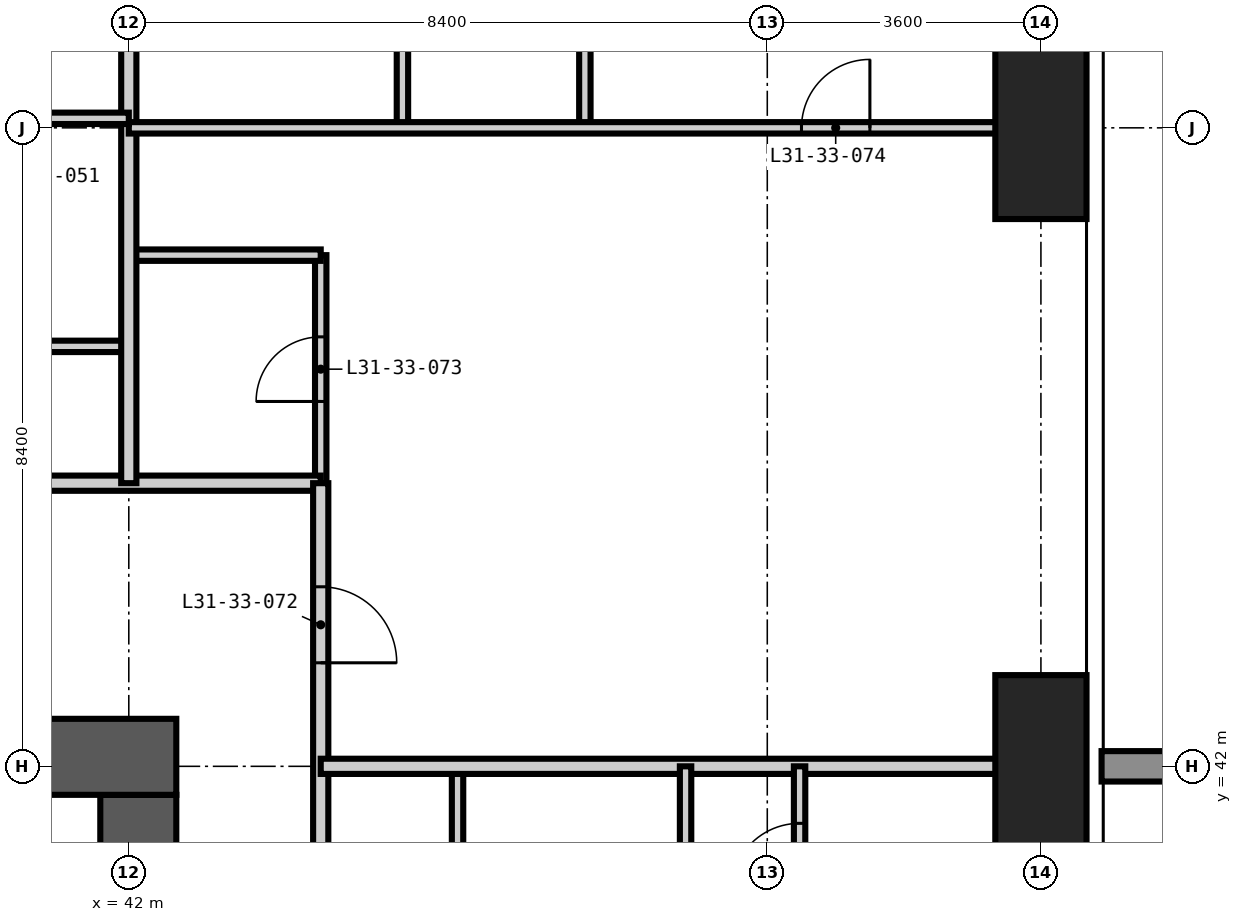
"""IFC4 building model, lengths in metres.
Left out: names, types, materials, properties, quantities, classifications, styles, units other than length and angle.
Written with IfcOpenShell. Run it as: python <this file> out.ifc"""

import sys

from ifc_helpers import new_model, si_unit, direction, frame, frame_2d, origin, origin_2d, place, context, subcontext, project, spatial, rectangle, extrude, element, fill, save


model = new_model("IFC4")
c1 = context("Model", 3, precision=1e-05, world=origin(), true_north=direction((0.0, 1.0)))
c2 = subcontext(c1, "Body", "Model", "MODEL_VIEW")
j1 = project(units=[si_unit("LENGTHUNIT", "METRE"), si_unit("PLANEANGLEUNIT", "RADIAN")], contexts=[c1])
p1 = place(None, origin())
s1 = spatial("IfcSite", under=j1, at=p1, CompositionType="ELEMENT")
p2 = place(p1, origin())
s2 = spatial("IfcBuilding", under=s1, at=p2, CompositionType="ELEMENT")
p3 = place(p2, frame((0.0, 0.0, 122.4)))
s3 = spatial("IfcBuildingStorey", under=s2, at=p3, CompositionType="ELEMENT", Elevation=122.4)
for number, where, z_axis, x_axis in (
    (1, (54.0, 42.0, -0.35), (0.0, 0.0, 1.0), (1.0, 0.0, 0.0)),
    (2, (54.0, 50.4, -0.35), (0.0, 0.0, 1.0), (1.0, 0.0, 0.0)),
):
    element("IfcColumn", number, at=place(p3, frame(where, z_axis=z_axis, x_axis=x_axis)), inside=s3, PredefinedType="COLUMN", context=c2, shape_type="SweptSolid", body=[
        extrude(rectangle(XDim=1.2, YDim=2.4, at=origin_2d()), origin(), (0.0, 0.0, 1.0), 3.6),
    ])
p4 = place(p3, frame((42.125, 17.175, -0.35), z_axis=(0.0, 0.0, 1.0), x_axis=(0.0, 1.0, 0.0)))
e3 = element("IfcWall", 3, at=p4, inside=s3, PredefinedType="SHEAR", context=c2, shape_type="SweptSolid", body=[
    extrude(rectangle(XDim=24.45, YDim=1.0, at=frame_2d((12.225, 0.0))), origin(), (0.0, 0.0, 1.0), 3.6),
])
p5 = place(p4, frame((0.425, 0.0, 0.35)))
e4 = element("IfcOpeningElement", 4, at=p5, cuts=e3, PredefinedType="OPENING", context=c2, shape_type="SweptSolid", body=[
    extrude(rectangle(XDim=1.2, YDim=2.2, at=frame_2d((0.6, 1.1))), frame((0.0, 0.51, 0.0), z_axis=(0.0, -1.0, 0.0), x_axis=(1.0, 0.0, 0.0)), (0.0, 0.0, 1.0), 1.02),
])
p6 = place(p4, frame((11.325, 0.0, 0.35)))
e5 = element("IfcOpeningElement", 5, at=p6, cuts=e3, PredefinedType="OPENING", context=c2, shape_type="SweptSolid", body=[
    extrude(rectangle(XDim=1.8, YDim=2.2, at=frame_2d((0.9, 1.1))), frame((0.0, 0.51, 0.0), z_axis=(0.0, -1.0, 0.0), x_axis=(1.0, 0.0, 0.0)), (0.0, 0.0, 1.0), 1.02),
])
p7 = place(p4, frame((20.125, 0.0, 0.35)))
e6 = element("IfcOpeningElement", 6, at=p7, cuts=e3, PredefinedType="OPENING", context=c2, shape_type="SweptSolid", body=[
    extrude(rectangle(XDim=1.0, YDim=2.1, at=frame_2d((0.5, 1.05))), frame((0.0, 0.51, 0.0), z_axis=(0.0, -1.0, 0.0), x_axis=(1.0, 0.0, 0.0)), (0.0, 0.0, 1.0), 1.02),
])
p8 = place(p3, frame((42.625, 42.125, -0.35), z_axis=(0.0, 0.0, 1.0), x_axis=(-1.0, 0.0, 0.0)))
e7 = element("IfcWall", 7, at=p8, inside=s3, PredefinedType="SHEAR", context=c2, shape_type="SweptSolid", body=[
    extrude(rectangle(XDim=26.45, YDim=1.0, at=frame_2d((13.225, 0.0))), origin(), (0.0, 0.0, 1.0), 3.6),
])
p9 = place(p8, frame((21.125, 0.0, 0.35)))
e8 = element("IfcOpeningElement", 8, at=p9, cuts=e7, PredefinedType="OPENING", context=c2, shape_type="SweptSolid", body=[
    extrude(rectangle(XDim=1.0, YDim=2.1, at=frame_2d((0.5, 1.05))), frame((0.0, 0.51, 0.0), z_axis=(0.0, -1.0, 0.0), x_axis=(1.0, 0.0, 0.0)), (0.0, 0.0, 1.0), 1.02),
])
p10 = place(p8, frame((10.525, 0.0, 0.35)))
e9 = element("IfcOpeningElement", 9, at=p10, cuts=e7, PredefinedType="OPENING", context=c2, shape_type="SweptSolid", body=[
    extrude(rectangle(XDim=1.2, YDim=2.2, at=frame_2d((0.6, 1.1))), frame((0.0, 0.51, 0.0), z_axis=(0.0, -1.0, 0.0), x_axis=(1.0, 0.0, 0.0)), (0.0, 0.0, 1.0), 1.02),
])
p11 = place(p3, frame((44.525, 45.725, 0.0), z_axis=(0.0, 0.0, 1.0), x_axis=(0.0, 1.0, 0.0)))
e10 = element("IfcWall", 10, at=p11, inside=s3, PredefinedType="PARTITIONING", context=c2, shape_type="SweptSolid", body=[
    extrude(rectangle(XDim=3.0, YDim=0.15, at=frame_2d((1.5, 0.0))), origin(), (0.0, 0.0, 1.0), 3.25),
])
p12 = place(p11, frame((1.075, 0.0, 0.0)))
e11 = element("IfcOpeningElement", 11, at=p12, cuts=e10, PredefinedType="OPENING", context=c2, shape_type="SweptSolid", body=[
    extrude(rectangle(XDim=0.85, YDim=2.1, at=frame_2d((0.425, 1.05))), frame((0.0, 0.085, 0.0), z_axis=(0.0, -1.0, 0.0), x_axis=(1.0, 0.0, 0.0)), (0.0, 0.0, 1.0), 0.17),
])
for number, where, z_axis, x_axis in (
    (12, (46.325, 39.6, 0.0), (0.0, 0.0, 1.0), (0.0, 1.0, 0.0)),
    (13, (39.6, 47.525, 0.0), (0.0, 0.0, 1.0), (1.0, 0.0, 0.0)),
):
    element("IfcWall", number, at=place(p3, frame(where, z_axis=z_axis, x_axis=x_axis)), inside=s3, PredefinedType="PARTITIONING", context=c2, shape_type="SweptSolid", body=[
        extrude(rectangle(XDim=2.4, YDim=0.15, at=frame_2d((1.2, 0.0))), origin(), (0.0, 0.0, 1.0), 3.25),
    ])
p13 = place(p3, frame((42.0, 48.725, 0.0), z_axis=(0.0, 0.0, 1.0), x_axis=(1.0, 0.0, 0.0)))
e14 = element("IfcWall", 14, at=p13, inside=s3, PredefinedType="PARTITIONING", context=c2, shape_type="SweptSolid", body=[
    extrude(rectangle(XDim=2.525, YDim=0.15, at=frame_2d((1.262, 0.0))), origin(), (0.0, 0.0, 1.0), 3.25),
])
p14 = place(p3, frame((12.6, 45.725, 0.0), z_axis=(0.0, 0.0, 1.0), x_axis=(1.0, 0.0, 0.0)))
e15 = element("IfcWall", 15, at=p14, inside=s3, PredefinedType="PARTITIONING", context=c2, shape_type="SweptSolid", body=[
    extrude(rectangle(XDim=31.925, YDim=0.2, at=frame_2d((15.962, 0.0))), origin(), (0.0, 0.0, 1.0), 3.25),
])
p15 = place(p14, frame((6.7, 0.0, 0.0)))
e16 = element("IfcOpeningElement", 16, at=p15, cuts=e15, PredefinedType="OPENING", context=c2, shape_type="SweptSolid", body=[
    extrude(rectangle(XDim=1.0, YDim=2.2, at=frame_2d((0.5, 1.1))), frame((0.0, 0.11, 0.0), z_axis=(0.0, -1.0, 0.0), x_axis=(1.0, 0.0, 0.0)), (0.0, 0.0, 1.0), 0.22),
])
p16 = place(p14, frame((17.5, 0.0, 0.0)))
e17 = element("IfcOpeningElement", 17, at=p16, cuts=e15, PredefinedType="OPENING", context=c2, shape_type="SweptSolid", body=[
    extrude(rectangle(XDim=1.0, YDim=2.2, at=frame_2d((0.5, 1.1))), frame((0.0, 0.11, 0.0), z_axis=(0.0, -1.0, 0.0), x_axis=(1.0, 0.0, 0.0)), (0.0, 0.0, 1.0), 0.22),
])
p17 = place(p14, frame((23.5, 0.0, 0.0)))
e18 = element("IfcOpeningElement", 18, at=p17, cuts=e15, PredefinedType="OPENING", context=c2, shape_type="SweptSolid", body=[
    extrude(rectangle(XDim=1.0, YDim=2.2, at=frame_2d((0.5, 1.1))), frame((0.0, 0.11, 0.0), z_axis=(0.0, -1.0, 0.0), x_axis=(1.0, 0.0, 0.0)), (0.0, 0.0, 1.0), 0.22),
])
p18 = place(p3, frame((44.525, 45.725, 0.0), z_axis=(0.0, 0.0, 1.0), x_axis=(0.0, -1.0, 0.0)))
e19 = element("IfcWall", 19, at=p18, inside=s3, PredefinedType="PARTITIONING", context=c2, shape_type="SweptSolid", body=[
    extrude(rectangle(XDim=32.05, YDim=0.2, at=frame_2d((16.025, 0.0))), origin(), (0.0, 0.0, 1.0), 3.25),
])
p19 = place(p18, frame((25.425, 0.0, 0.0)))
e20 = element("IfcOpeningElement", 20, at=p19, cuts=e19, PredefinedType="OPENING", context=c2, shape_type="SweptSolid", body=[
    extrude(rectangle(XDim=1.0, YDim=2.2, at=frame_2d((0.5, 1.1))), frame((0.0, 0.11, 0.0), z_axis=(0.0, -1.0, 0.0), x_axis=(1.0, 0.0, 0.0)), (0.0, 0.0, 1.0), 0.22),
])
p20 = place(p18, frame((14.625, 0.0, 0.0)))
e21 = element("IfcOpeningElement", 21, at=p20, cuts=e19, PredefinedType="OPENING", context=c2, shape_type="SweptSolid", body=[
    extrude(rectangle(XDim=1.0, YDim=2.2, at=frame_2d((0.5, 1.1))), frame((0.0, 0.11, 0.0), z_axis=(0.0, -1.0, 0.0), x_axis=(1.0, 0.0, 0.0)), (0.0, 0.0, 1.0), 0.22),
])
p21 = place(p18, frame((8.625, 0.0, 0.0)))
e22 = element("IfcOpeningElement", 22, at=p21, cuts=e19, PredefinedType="OPENING", context=c2, shape_type="SweptSolid", body=[
    extrude(rectangle(XDim=1.0, YDim=2.2, at=frame_2d((0.5, 1.1))), frame((0.0, 0.11, 0.0), z_axis=(0.0, -1.0, 0.0), x_axis=(1.0, 0.0, 0.0)), (0.0, 0.0, 1.0), 0.22),
])
p22 = place(p18, frame((29.987, 0.0, 0.0)))
e23 = element("IfcOpeningElement", 23, at=p22, cuts=e19, PredefinedType="OPENING", context=c2, shape_type="SweptSolid", body=[
    extrude(rectangle(XDim=1.0, YDim=2.2, at=frame_2d((0.5, 1.1))), frame((0.0, 0.11, 0.0), z_axis=(0.0, -1.0, 0.0), x_axis=(1.0, 0.0, 0.0)), (0.0, 0.0, 1.0), 0.22),
])
p23 = place(p18, frame((1.363, 0.0, 0.0)))
e24 = element("IfcOpeningElement", 24, at=p23, cuts=e19, PredefinedType="OPENING", context=c2, shape_type="SweptSolid", body=[
    extrude(rectangle(XDim=1.0, YDim=2.2, at=frame_2d((0.5, 1.1))), frame((0.0, 0.11, 0.0), z_axis=(0.0, -1.0, 0.0), x_axis=(1.0, 0.0, 0.0)), (0.0, 0.0, 1.0), 0.22),
])
p24 = place(p3, frame((42.0, 45.725, 0.0), z_axis=(0.0, 0.0, 1.0), x_axis=(0.0, 1.0, 0.0)))
e25 = element("IfcWall", 25, at=p24, inside=s3, PredefinedType="PARTITIONING", context=c2, shape_type="SweptSolid", body=[
    extrude(rectangle(XDim=8.893, YDim=0.2, at=frame_2d((4.446, 0.0))), origin(), (0.0, 0.0, 1.0), 3.25),
])
p25 = place(p3, frame((44.525, 42.0, 0.0), z_axis=(0.0, 0.0, 1.0), x_axis=(1.0, 0.0, 0.0)))
e26 = element("IfcWall", 26, at=p25, inside=s3, PredefinedType="PARTITIONING", context=c2, shape_type="SweptSolid", body=[
    extrude(rectangle(XDim=10.093, YDim=0.2, at=frame_2d((5.046, 0.0))), origin(), (0.0, 0.0, 1.0), 3.25),
])
p26 = place(p3, frame((45.6, 50.4, 0.0), z_axis=(0.0, 0.0, 1.0), x_axis=(0.0, 1.0, 0.0)))
e27 = element("IfcWall", 27, at=p26, inside=s3, PredefinedType="PARTITIONING", context=c2, shape_type="SweptSolid", body=[
    extrude(rectangle(XDim=3.0, YDim=0.15, at=frame_2d((1.5, 0.0))), origin(), (0.0, 0.0, 1.0), 3.25),
])
p27 = place(p3, frame((48.0, 50.4, 0.0), z_axis=(0.0, 0.0, 1.0), x_axis=(0.0, 1.0, 0.0)))
e28 = element("IfcWall", 28, at=p27, inside=s3, PredefinedType="PARTITIONING", context=c2, shape_type="SweptSolid", body=[
    extrude(rectangle(XDim=3.0, YDim=0.15, at=frame_2d((1.5, 0.0))), origin(), (0.0, 0.0, 1.0), 3.25),
])
p28 = place(p27, frame((1.05, 0.0, 0.0)))
e29 = element("IfcOpeningElement", 29, at=p28, cuts=e28, PredefinedType="OPENING", context=c2, shape_type="SweptSolid", body=[
    extrude(rectangle(XDim=0.9, YDim=2.1, at=frame_2d((0.45, 1.05))), frame((0.0, 0.085, 0.0), z_axis=(0.0, -1.0, 0.0), x_axis=(1.0, 0.0, 0.0)), (0.0, 0.0, 1.0), 0.17),
])
p29 = place(p3, frame((49.325, 39.6, 0.0), z_axis=(0.0, 0.0, 1.0), x_axis=(0.0, 1.0, 0.0)))
e30 = element("IfcWall", 30, at=p29, inside=s3, PredefinedType="PARTITIONING", context=c2, shape_type="SweptSolid", body=[
    extrude(rectangle(XDim=2.4, YDim=0.15, at=frame_2d((1.2, 0.0))), origin(), (0.0, 0.0, 1.0), 3.25),
])
p30 = place(p3, frame((50.825, 39.6, 0.0), z_axis=(0.0, 0.0, 1.0), x_axis=(0.0, 1.0, 0.0)))
e31 = element("IfcWall", 31, at=p30, inside=s3, PredefinedType="PARTITIONING", context=c2, shape_type="SweptSolid", body=[
    extrude(rectangle(XDim=2.4, YDim=0.15, at=frame_2d((1.2, 0.0))), origin(), (0.0, 0.0, 1.0), 3.25),
])
p31 = place(p30, frame((0.75, 0.0, 0.0)))
e32 = element("IfcOpeningElement", 32, at=p31, cuts=e31, PredefinedType="OPENING", context=c2, shape_type="SweptSolid", body=[
    extrude(rectangle(XDim=0.9, YDim=2.1, at=frame_2d((0.45, 1.05))), frame((0.0, 0.085, 0.0), z_axis=(0.0, -1.0, 0.0), x_axis=(1.0, 0.0, 0.0)), (0.0, 0.0, 1.0), 0.17),
])
p32 = place(p3, frame((42.0, 50.4, 0.0), z_axis=(0.0, 0.0, 1.0), x_axis=(1.0, 0.0, 0.0)))
e33 = element("IfcWall", 33, at=p32, inside=s3, PredefinedType="PARTITIONING", context=c2, shape_type="SweptSolid", body=[
    extrude(rectangle(XDim=12.618, YDim=0.15, at=frame_2d((6.309, 0.0))), origin(), (0.0, 0.0, 1.0), 3.25),
])
p33 = place(p32, frame((8.85, 0.0, 0.0)))
e34 = element("IfcOpeningElement", 34, at=p33, cuts=e33, PredefinedType="OPENING", context=c2, shape_type="SweptSolid", body=[
    extrude(rectangle(XDim=0.9, YDim=2.1, at=frame_2d((0.45, 1.05))), frame((0.0, 0.085, 0.0), z_axis=(0.0, -1.0, 0.0), x_axis=(1.0, 0.0, 0.0)), (0.0, 0.0, 1.0), 0.17),
])
p34 = place(p3, frame((39.6, 50.525, 0.0), z_axis=(0.0, 0.0, 1.0), x_axis=(1.0, 0.0, 0.0)))
e35 = element("IfcWall", 35, at=p34, inside=s3, PredefinedType="PARTITIONING", context=c2, shape_type="SweptSolid", body=[
    extrude(rectangle(XDim=2.4, YDim=0.15, at=frame_2d((1.2, 0.0))), origin(), (0.0, 0.0, 1.0), 3.25),
])
p35 = place(p31, origin())
e36 = element("IfcDoor", 36, at=p35, inside=s3, OperationType="SINGLE_SWING_LEFT", PredefinedType="DOOR", context=c2, shape_type="SweptSolid", body=[
    extrude(rectangle(XDim=0.9, YDim=2.1, at=frame_2d((0.45, 1.05))), frame((0.0, 0.025, 0.0), z_axis=(0.0, -1.0, 0.0), x_axis=(1.0, 0.0, 0.0)), (0.0, 0.0, 1.0), 0.05),
])
fill(e32, e36)
p36 = place(p23, origin())
e37 = element("IfcDoor", 37, at=p36, inside=s3, OperationType="SINGLE_SWING_RIGHT", PredefinedType="DOOR", context=c2, shape_type="SweptSolid", body=[
    extrude(rectangle(XDim=1.0, YDim=2.2, at=frame_2d((0.5, 1.1))), frame((0.0, 0.025, 0.0), z_axis=(0.0, -1.0, 0.0), x_axis=(1.0, 0.0, 0.0)), (0.0, 0.0, 1.0), 0.05),
])
fill(e24, e37)
p37 = place(p12, origin())
e38 = element("IfcDoor", 38, at=p37, inside=s3, OperationType="SINGLE_SWING_LEFT", PredefinedType="DOOR", context=c2, shape_type="SweptSolid", body=[
    extrude(rectangle(XDim=0.85, YDim=2.1, at=frame_2d((0.425, 1.05))), frame((0.0, 0.025, 0.0), z_axis=(0.0, -1.0, 0.0), x_axis=(1.0, 0.0, 0.0)), (0.0, 0.0, 1.0), 0.05),
])
fill(e11, e38)
p38 = place(p33, origin())
e39 = element("IfcDoor", 39, at=p38, inside=s3, OperationType="SINGLE_SWING_RIGHT", PredefinedType="DOOR", context=c2, shape_type="SweptSolid", body=[
    extrude(rectangle(XDim=0.9, YDim=2.1, at=frame_2d((0.45, 1.05))), frame((0.0, 0.025, 0.0), z_axis=(0.0, -1.0, 0.0), x_axis=(1.0, 0.0, 0.0)), (0.0, 0.0, 1.0), 0.05),
])
fill(e34, e39)
save(model, sys.argv[1])
